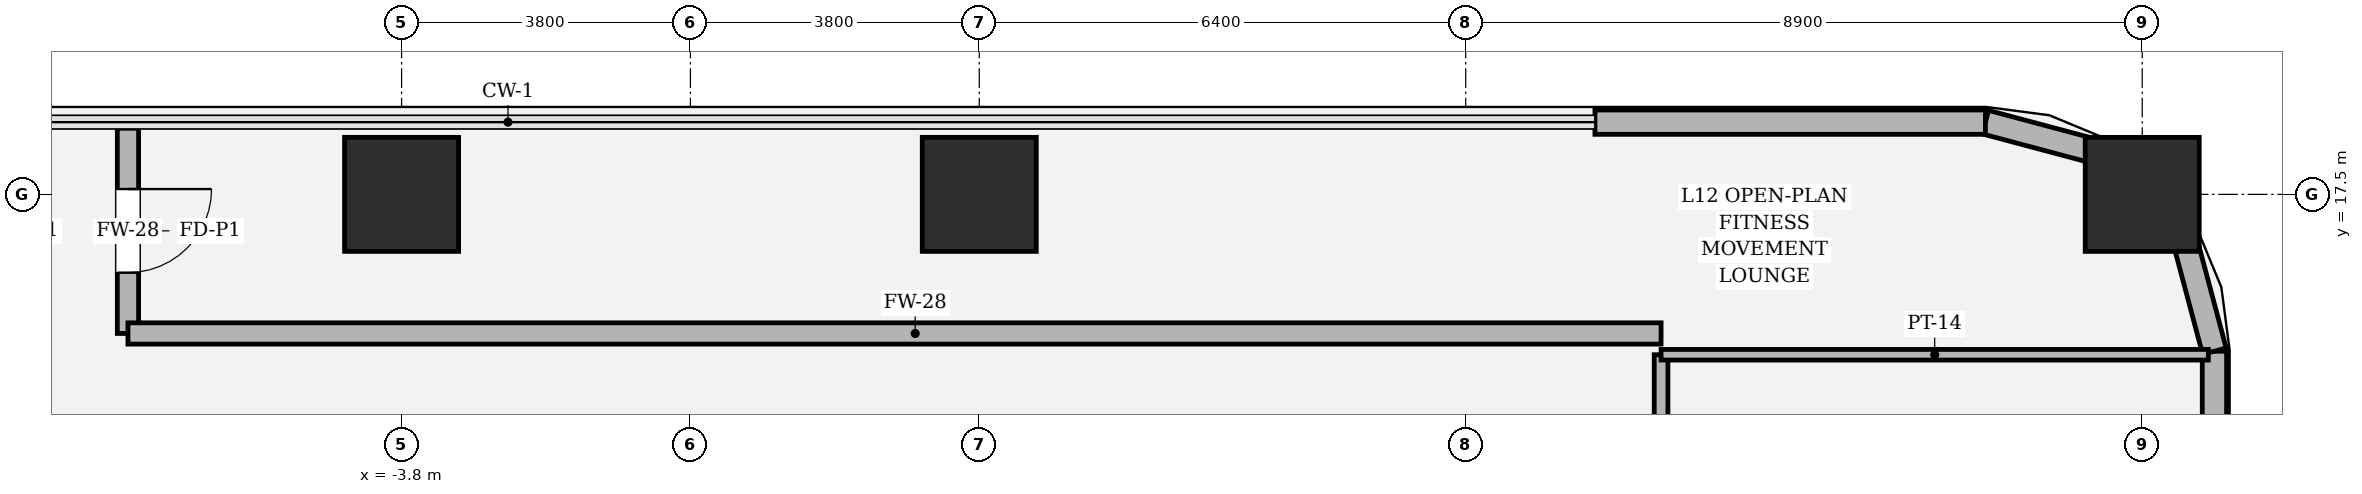
"""IFC4 building model, lengths in metres.
Left out: names, types, materials, properties, quantities, classifications, styles, units other than length and angle.
Written with IfcOpenShell. Run it as: python <this file> out.ifc"""

import sys

from ifc_helpers import new_model, si_unit, direction, frame, frame_2d, origin, origin_2d, place, context, subcontext, project, spatial, rectangle, hollow_rectangle, extrude, element, fill, save


model = new_model("IFC4")
c1 = context("Model", 3, precision=1e-05, world=origin(), true_north=direction((0.0, 1.0)))
c2 = subcontext(c1, "Body", "Model", "MODEL_VIEW")
j1 = project(units=[si_unit("LENGTHUNIT", "METRE"), si_unit("PLANEANGLEUNIT", "RADIAN")], contexts=[c1])
p1 = place(None, origin())
s1 = spatial("IfcSite", under=j1, at=p1, CompositionType="ELEMENT")
p2 = place(p1, origin())
s2 = spatial("IfcBuilding", under=s1, at=p2, CompositionType="ELEMENT")
p3 = place(p2, frame((0.0, 0.0, 56.55)))
s3 = spatial("IfcBuildingStorey", under=s2, at=p3, CompositionType="ELEMENT", Elevation=56.55)
for number, where, z_axis, x_axis in (
    (1, (19.1, 17.5, 0.0), (0.0, 0.0, 1.0), (1.0, 0.0, 0.0)),
    (2, (3.8, 17.5, 0.0), (0.0, 0.0, 1.0), (1.0, 0.0, 0.0)),
    (3, (-3.8, 17.5, 0.0), (0.0, 0.0, 1.0), (1.0, 0.0, 0.0)),
):
    element("IfcColumn", number, at=place(p3, frame(where, z_axis=z_axis, x_axis=x_axis)), inside=s3, PredefinedType="COLUMN", context=c2, shape_type="SweptSolid", body=[
        extrude(hollow_rectangle(XDim=1.5, YDim=1.5, WallThickness=0.045, at=origin_2d()), origin(), (0.0, 0.0, 1.0), 4.05),
    ])
p4 = place(p3, frame((20.05, 10.3, 0.0), z_axis=(0.0, 0.0, 1.0), x_axis=(0.0, 1.0, 0.0)))
e4 = element("IfcWall", 4, at=p4, inside=s3, PredefinedType="SOLIDWALL", context=c2, shape_type="SweptSolid", body=[
    extrude(rectangle(XDim=5.137, YDim=0.32, at=frame_2d((2.568, 0.0))), origin(), (0.0, 0.0, 1.0), 3.77),
])
p5 = place(p3, frame((20.05, 15.437, 0.0), z_axis=(0.0, 0.0, 1.0), x_axis=(-0.257847112249, 0.966185730957, 0.0)))
e5 = element("IfcWall", 5, at=p5, inside=s3, PredefinedType="SOLIDWALL", context=c2, shape_type="SweptSolid", body=[
    extrude(rectangle(XDim=1.565, YDim=0.32, at=frame_2d((0.783, 0.0))), origin(), (0.0, 0.0, 1.0), 3.77),
])
p6 = place(p3, frame((19.646, 16.949, 0.0), z_axis=(0.0, 0.0, 1.0), x_axis=(-0.707106781187, 0.707106781187, 0.0)))
e6 = element("IfcWall", 6, at=p6, inside=s3, PredefinedType="SOLIDWALL", context=c2, shape_type="SweptSolid", body=[
    extrude(rectangle(XDim=1.552, YDim=0.32, at=frame_2d((0.776, 0.0))), origin(), (0.0, 0.0, 1.0), 2.444),
])
p7 = place(p3, frame((18.549, 18.047, 0.0), z_axis=(0.0, 0.0, 1.0), x_axis=(-0.966224582397, 0.257701486942, 0.0)))
e7 = element("IfcWall", 7, at=p7, inside=s3, PredefinedType="SOLIDWALL", context=c2, shape_type="SweptSolid", body=[
    extrude(rectangle(XDim=1.565, YDim=0.32, at=frame_2d((0.783, 0.0))), origin(), (0.0, 0.0, 1.0), 3.77),
])
p8 = place(p3, frame((17.037, 18.45, 0.0), z_axis=(0.0, 0.0, 1.0), x_axis=(-1.0, 0.0, 0.0)))
e8 = element("IfcWall", 8, at=p8, inside=s3, PredefinedType="SOLIDWALL", context=c2, shape_type="SweptSolid", body=[
    extrude(rectangle(XDim=5.137, YDim=0.32, at=frame_2d((2.568, 0.0))), origin(), (0.0, 0.0, 1.0), 3.77),
])
p9 = place(p3, frame((12.77, 13.38, 0.0), z_axis=(0.0, 0.0, 1.0), x_axis=(0.0, 1.0, 0.0)))
e9 = element("IfcWall", 9, at=p9, inside=s3, PredefinedType="PARTITIONING", context=c2, shape_type="SweptSolid", body=[
    extrude(rectangle(XDim=2.01, YDim=0.18, at=frame_2d((1.005, 0.0))), origin(), (0.0, 0.0, 1.0), 3.314),
])
p10 = place(p3, frame((12.77, 15.39, 0.0), z_axis=(0.0, 0.0, 1.0), x_axis=(1.0, 0.0, 0.0)))
e10 = element("IfcWall", 10, at=p10, inside=s3, PredefinedType="PARTITIONING", context=c2, shape_type="SweptSolid", body=[
    extrude(rectangle(XDim=7.2, YDim=0.14, at=frame_2d((3.6, 0.0))), origin(), (0.0, 0.0, 1.0), 2.444),
])
p11 = place(p3, frame((-7.4, 15.67, 0.0), z_axis=(0.0, 0.0, 1.0), x_axis=(0.0, 1.0, 0.0)))
e11 = element("IfcWall", 11, at=p11, inside=s3, PredefinedType="SOLIDWALL", context=c2, shape_type="SweptSolid", body=[
    extrude(rectangle(XDim=2.7, YDim=0.28, at=frame_2d((1.35, 0.0))), origin(), (0.0, 0.0, 1.0), 2.444),
])
p12 = place(p11, frame((0.8, 0.0, 0.0)))
e12 = element("IfcOpeningElement", 12, at=p12, cuts=e11, PredefinedType="OPENING", context=c2, shape_type="SweptSolid", body=[
    extrude(rectangle(XDim=1.1, YDim=2.2, at=frame_2d((0.55, 1.1))), frame((0.0, 0.15, 0.0), z_axis=(0.0, -1.0, 0.0), x_axis=(1.0, 0.0, 0.0)), (0.0, 0.0, 1.0), 0.3),
])
p13 = place(p3, frame((12.77, 15.67, 0.0), z_axis=(0.0, 0.0, 1.0), x_axis=(-1.0, 0.0, 0.0)))
e13 = element("IfcWall", 13, at=p13, inside=s3, PredefinedType="SOLIDWALL", context=c2, shape_type="SweptSolid", body=[
    extrude(rectangle(XDim=20.17, YDim=0.28, at=frame_2d((10.085, 0.0))), origin(), (0.0, 0.0, 1.0), 2.444),
])
p14 = place(p12, origin())
e14 = element("IfcDoor", 14, at=p14, inside=s3, OperationType="SINGLE_SWING_RIGHT", PredefinedType="DOOR", context=c2, shape_type="SweptSolid", body=[
    extrude(rectangle(XDim=1.1, YDim=2.2, at=frame_2d((0.55, 1.1))), frame((0.0, 0.025, 0.0), z_axis=(0.0, -1.0, 0.0), x_axis=(1.0, 0.0, 0.0)), (0.0, 0.0, 1.0), 0.05),
])
fill(e12, e14)
save(model, sys.argv[1])
